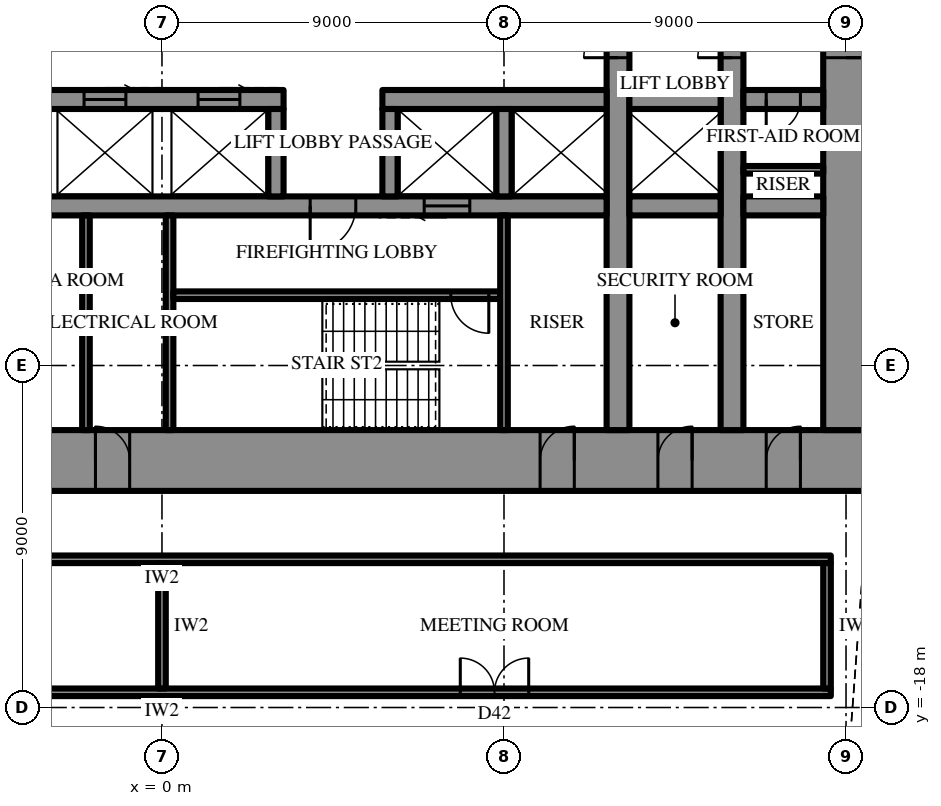
"""IFC4 building model, lengths in metres.
Left out: names, types, materials, properties, quantities, classifications, styles, units other than length and angle.
Written with IfcOpenShell. Run it as: python <this file> out.ifc"""

import sys

from ifc_helpers import new_model, si_unit, direction, frame, frame_2d, origin, place, context, subcontext, project, spatial, rectangle, extrude, element, fill, save


model = new_model("IFC4")
c1 = context("Model", 3, precision=1e-05, world=origin(), true_north=direction((0.0, 1.0)))
c2 = subcontext(c1, "Body", "Model", "MODEL_VIEW")
j1 = project(units=[si_unit("LENGTHUNIT", "METRE"), si_unit("PLANEANGLEUNIT", "RADIAN")], contexts=[c1])
p1 = place(None, origin())
s1 = spatial("IfcSite", under=j1, at=p1, CompositionType="ELEMENT")
p2 = place(p1, origin())
s2 = spatial("IfcBuilding", under=s1, at=p2, CompositionType="ELEMENT")
p3 = place(p2, frame((0.0, 0.0, 132.1)))
s3 = spatial("IfcBuildingStorey", under=s2, at=p3, CompositionType="ELEMENT", Elevation=132.1)
p4 = place(p3, frame((18.6, -11.5, 0.0), z_axis=(0.0, 0.0, 1.0), x_axis=(-1.0, 0.0, 0.0)))
e1 = element("IfcWall", 1, at=p4, inside=s3, PredefinedType="SHEAR", context=c2, shape_type="SweptSolid", body=[
    extrude(rectangle(XDim=37.2, YDim=1.6, at=frame_2d((18.6, 0.0))), origin(), (0.0, 0.0, 1.0), 4.2),
])
p5 = place(p4, frame((19.45, 0.0, 0.0)))
e2 = element("IfcOpeningElement", 2, at=p5, cuts=e1, PredefinedType="OPENING", context=c2, shape_type="SweptSolid", body=[
    extrude(rectangle(XDim=0.9, YDim=2.2, at=frame_2d((0.45, 1.1))), frame((0.0, 0.81, 0.0), z_axis=(0.0, -1.0, 0.0), x_axis=(1.0, 0.0, 0.0)), (0.0, 0.0, 1.0), 1.62),
])
p6 = place(p4, frame((22.45, 0.0, 0.0)))
e3 = element("IfcOpeningElement", 3, at=p6, cuts=e1, PredefinedType="OPENING", context=c2, shape_type="SweptSolid", body=[
    extrude(rectangle(XDim=0.9, YDim=2.2, at=frame_2d((0.45, 1.1))), frame((0.0, 0.81, 0.0), z_axis=(0.0, -1.0, 0.0), x_axis=(1.0, 0.0, 0.0)), (0.0, 0.0, 1.0), 1.62),
])
p7 = place(p4, frame((25.5, 0.0, 0.0)))
e4 = element("IfcOpeningElement", 4, at=p7, cuts=e1, PredefinedType="OPENING", context=c2, shape_type="SweptSolid", body=[
    extrude(rectangle(XDim=1.0, YDim=2.2, at=frame_2d((0.5, 1.1))), frame((0.0, 0.81, 0.0), z_axis=(0.0, -1.0, 0.0), x_axis=(1.0, 0.0, 0.0)), (0.0, 0.0, 1.0), 1.62),
])
p8 = place(p4, frame((1.8, 0.0, 0.0)))
e5 = element("IfcOpeningElement", 5, at=p8, cuts=e1, PredefinedType="OPENING", context=c2, shape_type="SweptSolid", body=[
    extrude(rectangle(XDim=0.9, YDim=2.2, at=frame_2d((0.45, 1.1))), frame((0.0, 0.81, 0.0), z_axis=(0.0, -1.0, 0.0), x_axis=(1.0, 0.0, 0.0)), (0.0, 0.0, 1.0), 1.62),
])
p9 = place(p4, frame((4.65, 0.0, 0.0)))
e6 = element("IfcOpeningElement", 6, at=p9, cuts=e1, PredefinedType="OPENING", context=c2, shape_type="SweptSolid", body=[
    extrude(rectangle(XDim=0.9, YDim=2.2, at=frame_2d((0.45, 1.1))), frame((0.0, 0.81, 0.0), z_axis=(0.0, -1.0, 0.0), x_axis=(1.0, 0.0, 0.0)), (0.0, 0.0, 1.0), 1.62),
])
p10 = place(p4, frame((7.75, 0.0, 0.0)))
e7 = element("IfcOpeningElement", 7, at=p10, cuts=e1, PredefinedType="OPENING", context=c2, shape_type="SweptSolid", body=[
    extrude(rectangle(XDim=0.9, YDim=2.2, at=frame_2d((0.45, 1.1))), frame((0.0, 0.81, 0.0), z_axis=(0.0, -1.0, 0.0), x_axis=(1.0, 0.0, 0.0)), (0.0, 0.0, 1.0), 1.62),
])
p11 = place(p4, frame((28.55, 0.0, 0.0)))
e8 = element("IfcOpeningElement", 8, at=p11, cuts=e1, PredefinedType="OPENING", context=c2, shape_type="SweptSolid", body=[
    extrude(rectangle(XDim=0.9, YDim=2.2, at=frame_2d((0.45, 1.1))), frame((0.0, 0.81, 0.0), z_axis=(0.0, -1.0, 0.0), x_axis=(1.0, 0.0, 0.0)), (0.0, 0.0, 1.0), 1.62),
])
p12 = place(p4, frame((31.65, 0.0, 0.0)))
e9 = element("IfcOpeningElement", 9, at=p12, cuts=e1, PredefinedType="OPENING", context=c2, shape_type="SweptSolid", body=[
    extrude(rectangle(XDim=0.9, YDim=2.2, at=frame_2d((0.45, 1.1))), frame((0.0, 0.81, 0.0), z_axis=(0.0, -1.0, 0.0), x_axis=(1.0, 0.0, 0.0)), (0.0, 0.0, 1.0), 1.62),
])
p13 = place(p4, frame((34.5, 0.0, 0.0)))
e10 = element("IfcOpeningElement", 10, at=p13, cuts=e1, PredefinedType="OPENING", context=c2, shape_type="SweptSolid", body=[
    extrude(rectangle(XDim=0.9, YDim=2.2, at=frame_2d((0.45, 1.1))), frame((0.0, 0.81, 0.0), z_axis=(0.0, -1.0, 0.0), x_axis=(1.0, 0.0, 0.0)), (0.0, 0.0, 1.0), 1.62),
])
p14 = place(p3, frame((18.0, -10.7, 0.0), z_axis=(0.0, 0.0, 1.0), x_axis=(0.0, 1.0, 0.0)))
e11 = element("IfcWall", 11, at=p14, inside=s3, PredefinedType="SHEAR", context=c2, shape_type="SweptSolid", body=[
    extrude(rectangle(XDim=21.4, YDim=1.2, at=frame_2d((10.7, 0.0))), origin(), (0.0, 0.0, 1.0), 4.2),
])
p15 = place(p14, frame((9.8, 0.0, 0.0)))
e12 = element("IfcOpeningElement", 12, at=p15, cuts=e11, PredefinedType="OPENING", context=c2, shape_type="SweptSolid", body=[
    extrude(rectangle(XDim=1.8, YDim=2.4, at=frame_2d((0.9, 1.2))), frame((0.0, 0.61, 0.0), z_axis=(0.0, -1.0, 0.0), x_axis=(1.0, 0.0, 0.0)), (0.0, 0.0, 1.0), 1.22),
])
p16 = place(p3, frame((12.0, -10.7, 0.0), z_axis=(0.0, 0.0, 1.0), x_axis=(0.0, 1.0, 0.0)))
e13 = element("IfcWall", 13, at=p16, inside=s3, PredefinedType="SHEAR", context=c2, shape_type="SweptSolid", body=[
    extrude(rectangle(XDim=21.4, YDim=0.6, at=frame_2d((10.7, 0.0))), origin(), (0.0, 0.0, 1.0), 4.2),
])
p17 = place(p16, frame((9.8, 0.0, 0.0)))
e14 = element("IfcOpeningElement", 14, at=p17, cuts=e13, PredefinedType="OPENING", context=c2, shape_type="SweptSolid", body=[
    extrude(rectangle(XDim=1.8, YDim=2.4, at=frame_2d((0.9, 1.2))), frame((0.0, 0.31, 0.0), z_axis=(0.0, -1.0, 0.0), x_axis=(1.0, 0.0, 0.0)), (0.0, 0.0, 1.0), 0.62),
])
p18 = place(p3, frame((15.0, -10.7, 0.0), z_axis=(0.0, 0.0, 1.0), x_axis=(0.0, 1.0, 0.0)))
e15 = element("IfcWall", 15, at=p18, inside=s3, PredefinedType="SHEAR", context=c2, shape_type="SweptSolid", body=[
    extrude(rectangle(XDim=21.4, YDim=0.6, at=frame_2d((10.7, 0.0))), origin(), (0.0, 0.0, 1.0), 4.2),
])
p19 = place(p18, frame((9.8, 0.0, 0.0)))
e16 = element("IfcOpeningElement", 16, at=p19, cuts=e15, PredefinedType="OPENING", context=c2, shape_type="SweptSolid", body=[
    extrude(rectangle(XDim=1.8, YDim=2.4, at=frame_2d((0.9, 1.2))), frame((0.0, 0.31, 0.0), z_axis=(0.0, -1.0, 0.0), x_axis=(1.0, 0.0, 0.0)), (0.0, 0.0, 1.0), 0.62),
])
p20 = place(p3, frame((17.4, -2.0, 0.0), z_axis=(0.0, 0.0, 1.0), x_axis=(-1.0, 0.0, 0.0)))
e17 = element("IfcWall", 17, at=p20, inside=s3, PredefinedType="SHEAR", context=c2, shape_type="SweptSolid", body=[
    extrude(rectangle(XDim=2.1, YDim=0.5, at=frame_2d((1.05, 0.0))), origin(), (0.0, 0.0, 1.0), 4.2),
])
p21 = place(p20, frame((0.6, 0.0, 0.0)))
e18 = element("IfcOpeningElement", 18, at=p21, cuts=e17, PredefinedType="OPENING", context=c2, shape_type="SweptSolid", body=[
    extrude(rectangle(XDim=0.9, YDim=2.2, at=frame_2d((0.45, 1.1))), frame((0.0, 0.26, 0.0), z_axis=(0.0, -1.0, 0.0), x_axis=(1.0, 0.0, 0.0)), (0.0, 0.0, 1.0), 0.52),
])
p22 = place(p3, frame((14.7, -2.0, 0.0), z_axis=(0.0, 0.0, 1.0), x_axis=(-1.0, 0.0, 0.0)))
e19 = element("IfcWall", 19, at=p22, inside=s3, PredefinedType="SHEAR", context=c2, shape_type="SweptSolid", body=[
    extrude(rectangle(XDim=2.4, YDim=0.5, at=frame_2d((1.2, 0.0))), origin(), (0.0, 0.0, 1.0), 4.2),
])
p23 = place(p3, frame((11.7, -2.0, 0.0), z_axis=(0.0, 0.0, 1.0), x_axis=(-1.0, 0.0, 0.0)))
e20 = element("IfcWall", 20, at=p23, inside=s3, PredefinedType="SHEAR", context=c2, shape_type="SweptSolid", body=[
    extrude(rectangle(XDim=5.9, YDim=0.5, at=frame_2d((2.95, 0.0))), origin(), (0.0, 0.0, 1.0), 4.2),
])
p24 = place(p3, frame((3.2, -2.0, 0.0), z_axis=(0.0, 0.0, 1.0), x_axis=(-1.0, 0.0, 0.0)))
e21 = element("IfcWall", 21, at=p24, inside=s3, PredefinedType="SHEAR", context=c2, shape_type="SweptSolid", body=[
    extrude(rectangle(XDim=14.9, YDim=0.5, at=frame_2d((7.45, 0.0))), origin(), (0.0, 0.0, 1.0), 4.2),
])
p25 = place(p24, frame((1.15, 0.0, 0.0)))
e22 = element("IfcOpeningElement", 22, at=p25, cuts=e21, PredefinedType="OPENING", context=c2, shape_type="SweptSolid", body=[
    extrude(rectangle(XDim=1.1, YDim=2.2, at=frame_2d((0.55, 1.1))), frame((0.0, 0.26, 0.0), z_axis=(0.0, -1.0, 0.0), x_axis=(1.0, 0.0, 0.0)), (0.0, 0.0, 1.0), 0.52),
])
p26 = place(p24, frame((4.15, 0.0, 0.0)))
e23 = element("IfcOpeningElement", 23, at=p26, cuts=e21, PredefinedType="OPENING", context=c2, shape_type="SweptSolid", body=[
    extrude(rectangle(XDim=1.1, YDim=2.2, at=frame_2d((0.55, 1.1))), frame((0.0, 0.26, 0.0), z_axis=(0.0, -1.0, 0.0), x_axis=(1.0, 0.0, 0.0)), (0.0, 0.0, 1.0), 0.52),
])
p27 = place(p24, frame((7.15, 0.0, 0.0)))
e24 = element("IfcOpeningElement", 24, at=p27, cuts=e21, PredefinedType="OPENING", context=c2, shape_type="SweptSolid", body=[
    extrude(rectangle(XDim=1.1, YDim=2.2, at=frame_2d((0.55, 1.1))), frame((0.0, 0.26, 0.0), z_axis=(0.0, -1.0, 0.0), x_axis=(1.0, 0.0, 0.0)), (0.0, 0.0, 1.0), 0.52),
])
p28 = place(p24, frame((10.15, 0.0, 0.0)))
e25 = element("IfcOpeningElement", 25, at=p28, cuts=e21, PredefinedType="OPENING", context=c2, shape_type="SweptSolid", body=[
    extrude(rectangle(XDim=1.1, YDim=2.2, at=frame_2d((0.55, 1.1))), frame((0.0, 0.26, 0.0), z_axis=(0.0, -1.0, 0.0), x_axis=(1.0, 0.0, 0.0)), (0.0, 0.0, 1.0), 0.52),
])
p29 = place(p3, frame((17.4, -4.8, 0.0), z_axis=(0.0, 0.0, 1.0), x_axis=(-1.0, 0.0, 0.0)))
e26 = element("IfcWall", 26, at=p29, inside=s3, PredefinedType="SHEAR", context=c2, shape_type="SweptSolid", body=[
    extrude(rectangle(XDim=2.1, YDim=0.5, at=frame_2d((1.05, 0.0))), origin(), (0.0, 0.0, 1.0), 4.2),
])
p30 = place(p3, frame((14.7, -4.8, 0.0), z_axis=(0.0, 0.0, 1.0), x_axis=(-1.0, 0.0, 0.0)))
e27 = element("IfcWall", 27, at=p30, inside=s3, PredefinedType="SHEAR", context=c2, shape_type="SweptSolid", body=[
    extrude(rectangle(XDim=2.4, YDim=0.5, at=frame_2d((1.2, 0.0))), origin(), (0.0, 0.0, 1.0), 4.2),
])
p31 = place(p3, frame((11.7, -4.8, 0.0), z_axis=(0.0, 0.0, 1.0), x_axis=(-1.0, 0.0, 0.0)))
e28 = element("IfcWall", 28, at=p31, inside=s3, PredefinedType="SHEAR", context=c2, shape_type="SweptSolid", body=[
    extrude(rectangle(XDim=23.4, YDim=0.5, at=frame_2d((11.7, 0.0))), origin(), (0.0, 0.0, 1.0), 4.2),
])
p32 = place(p31, frame((6.6, 0.0, 0.0)))
e29 = element("IfcOpeningElement", 29, at=p32, cuts=e28, PredefinedType="OPENING", context=c2, shape_type="SweptSolid", body=[
    extrude(rectangle(XDim=1.2, YDim=2.2, at=frame_2d((0.6, 1.1))), frame((0.0, 0.26, 0.0), z_axis=(0.0, -1.0, 0.0), x_axis=(1.0, 0.0, 0.0)), (0.0, 0.0, 1.0), 0.52),
])
p33 = place(p31, frame((3.6, 0.0, 0.0)))
e30 = element("IfcOpeningElement", 30, at=p33, cuts=e28, PredefinedType="OPENING", context=c2, shape_type="SweptSolid", body=[
    extrude(rectangle(XDim=1.2, YDim=2.2, at=frame_2d((0.6, 1.1))), frame((0.0, 0.26, 0.0), z_axis=(0.0, -1.0, 0.0), x_axis=(1.0, 0.0, 0.0)), (0.0, 0.0, 1.0), 0.52),
])
for number, where, z_axis, x_axis in (
    (31, (9.0, -2.25, 0.0), (0.0, 0.0, 1.0), (0.0, -1.0, 0.0)),
    (32, (6.0, -2.25, 0.0), (0.0, 0.0, 1.0), (0.0, -1.0, 0.0)),
    (33, (3.0, -2.25, 0.0), (0.0, 0.0, 1.0), (0.0, -1.0, 0.0)),
):
    element("IfcWall", number, at=place(p3, frame(where, z_axis=z_axis, x_axis=x_axis)), inside=s3, PredefinedType="SHEAR", context=c2, shape_type="SweptSolid", body=[
        extrude(rectangle(XDim=2.3, YDim=0.4, at=frame_2d((1.15, 0.0))), origin(), (0.0, 0.0, 1.0), 4.2),
    ])
p34 = place(p3, frame((0.2, -5.05, 0.0), z_axis=(0.0, 0.0, 1.0), x_axis=(0.0, -1.0, 0.0)))
e34 = element("IfcWall", 34, at=p34, inside=s3, PredefinedType="SHEAR", context=c2, shape_type="SweptSolid", body=[
    extrude(rectangle(XDim=5.65, YDim=0.2, at=frame_2d((2.825, 0.0))), origin(), (0.0, 0.0, 1.0), 4.2),
])
p35 = place(p3, frame((8.9, -7.15, 0.0), z_axis=(0.0, 0.0, 1.0), x_axis=(-1.0, 0.0, 0.0)))
e35 = element("IfcWall", 35, at=p35, inside=s3, PredefinedType="SHEAR", context=c2, shape_type="SweptSolid", body=[
    extrude(rectangle(XDim=8.6, YDim=0.2, at=frame_2d((4.3, 0.0))), origin(), (0.0, 0.0, 1.0), 4.2),
])
p36 = place(p35, frame((0.3, 0.0, 0.0)))
e36 = element("IfcOpeningElement", 36, at=p36, cuts=e35, PredefinedType="OPENING", context=c2, shape_type="SweptSolid", body=[
    extrude(rectangle(XDim=1.0, YDim=2.2, at=frame_2d((0.5, 1.1))), frame((0.0, 0.11, 0.0), z_axis=(0.0, -1.0, 0.0), x_axis=(1.0, 0.0, 0.0)), (0.0, 0.0, 1.0), 0.22),
])
for number, where, z_axis, x_axis in (
    (37, (9.0, -5.05, 0.0), (0.0, 0.0, 1.0), (0.0, -1.0, 0.0)),
    (38, (-2.0, -5.05, 0.0), (0.0, 0.0, 1.0), (0.0, -1.0, 0.0)),
):
    element("IfcWall", number, at=place(p3, frame(where, z_axis=z_axis, x_axis=x_axis)), inside=s3, PredefinedType="PARTITIONING", context=c2, shape_type="SweptSolid", body=[
        extrude(rectangle(XDim=5.65, YDim=0.2, at=frame_2d((2.825, 0.0))), origin(), (0.0, 0.0, 1.0), 4.0),
    ])
p37 = place(p3, frame((17.4, -3.85, 0.0), z_axis=(0.0, 0.0, 1.0), x_axis=(-1.0, 0.0, 0.0)))
e39 = element("IfcWall", 39, at=p37, inside=s3, PredefinedType="PARTITIONING", context=c2, shape_type="SweptSolid", body=[
    extrude(rectangle(XDim=2.1, YDim=0.2, at=frame_2d((1.05, 0.0))), origin(), (0.0, 0.0, 1.0), 4.0),
])
p38 = place(p3, frame((17.6, -14.1, 0.0), z_axis=(0.0, 0.0, 1.0), x_axis=(-1.0, 0.0, 0.0)))
e40 = element("IfcWall", 40, at=p38, inside=s3, PredefinedType="PARTITIONING", context=c2, shape_type="SweptSolid", body=[
    extrude(rectangle(XDim=35.2, YDim=0.2, at=frame_2d((17.6, 0.0))), origin(), (0.0, 0.0, 1.0), 4.0),
])
p39 = place(p3, frame((17.6, -17.6, 0.0), z_axis=(0.0, 0.0, 1.0), x_axis=(-1.0, 0.0, 0.0)))
e41 = element("IfcWall", 41, at=p39, inside=s3, PredefinedType="PARTITIONING", context=c2, shape_type="SweptSolid", body=[
    extrude(rectangle(XDim=35.2, YDim=0.2, at=frame_2d((17.6, 0.0))), origin(), (0.0, 0.0, 1.0), 4.0),
])
p40 = place(p39, frame((7.95, 0.0, 0.0)))
e42 = element("IfcOpeningElement", 42, at=p40, cuts=e41, PredefinedType="OPENING", context=c2, shape_type="SweptSolid", body=[
    extrude(rectangle(XDim=1.8, YDim=2.4, at=frame_2d((0.9, 1.2))), frame((0.0, 0.11, 0.0), z_axis=(0.0, -1.0, 0.0), x_axis=(1.0, 0.0, 0.0)), (0.0, 0.0, 1.0), 0.22),
])
p41 = place(p39, frame((25.45, 0.0, 0.0)))
e43 = element("IfcOpeningElement", 43, at=p41, cuts=e41, PredefinedType="OPENING", context=c2, shape_type="SweptSolid", body=[
    extrude(rectangle(XDim=1.8, YDim=2.4, at=frame_2d((0.9, 1.2))), frame((0.0, 0.11, 0.0), z_axis=(0.0, -1.0, 0.0), x_axis=(1.0, 0.0, 0.0)), (0.0, 0.0, 1.0), 0.22),
])
p42 = place(p3, frame((17.5, -14.2, 0.0), z_axis=(0.0, 0.0, 1.0), x_axis=(0.0, -1.0, 0.0)))
e44 = element("IfcWall", 44, at=p42, inside=s3, PredefinedType="PARTITIONING", context=c2, shape_type="SweptSolid", body=[
    extrude(rectangle(XDim=3.3, YDim=0.2, at=frame_2d((1.65, 0.0))), origin(), (0.0, 0.0, 1.0), 4.0),
])
p43 = place(p3, frame((0.0, -14.2, 0.0), z_axis=(0.0, 0.0, 1.0), x_axis=(0.0, -1.0, 0.0)))
e45 = element("IfcWall", 45, at=p43, inside=s3, PredefinedType="PARTITIONING", context=c2, shape_type="SweptSolid", body=[
    extrude(rectangle(XDim=3.3, YDim=0.2, at=frame_2d((1.65, 0.0))), origin(), (0.0, 0.0, 1.0), 2.992),
])
p44 = place(p3, frame((17.463, -21.753, 0.0), z_axis=(0.0, 0.0, 1.0), x_axis=(0.500010972563, 0.86601906868, 0.0)))
e46 = element("IfcWall", 46, at=p44, inside=s3, PredefinedType="PARTITIONING", context=c2, shape_type="SweptSolid", body=[
    extrude(rectangle(XDim=15.211, YDim=0.2, at=frame_2d((7.605, 0.0))), origin(), (0.0, 0.0, 1.0), 4.0),
])
p45 = place(p44, frame((7.105, 0.0, 0.0)))
e47 = element("IfcOpeningElement", 47, at=p45, cuts=e46, PredefinedType="OPENING", context=c2, shape_type="SweptSolid", body=[
    extrude(rectangle(XDim=1.0, YDim=2.2, at=frame_2d((0.5, 1.1))), frame((0.0, 0.11, 0.0), z_axis=(0.0, -1.0, 0.0), x_axis=(1.0, 0.0, 0.0)), (0.0, 0.0, 1.0), 0.22),
])
p46 = place(p15, frame((1.8, 0.0, 0.0), z_axis=(0.0, 0.0, 1.0), x_axis=(-1.0, 0.0, 0.0)))
e48 = element("IfcDoor", 48, at=p46, inside=s3, OperationType="DOUBLE_DOOR_SINGLE_SWING", PredefinedType="DOOR", context=c2, shape_type="SweptSolid", body=[
    extrude(rectangle(XDim=1.8, YDim=2.4, at=frame_2d((0.9, 1.2))), frame((0.0, 0.025, 0.0), z_axis=(0.0, -1.0, 0.0), x_axis=(1.0, 0.0, 0.0)), (0.0, 0.0, 1.0), 0.05),
])
fill(e12, e48)
p47 = place(p32, origin())
e49 = element("IfcDoor", 49, at=p47, inside=s3, OperationType="SINGLE_SWING_LEFT", PredefinedType="DOOR", context=c2, shape_type="SweptSolid", body=[
    extrude(rectangle(XDim=1.2, YDim=2.2, at=frame_2d((0.6, 1.1))), frame((0.0, 0.025, 0.0), z_axis=(0.0, -1.0, 0.0), x_axis=(1.0, 0.0, 0.0)), (0.0, 0.0, 1.0), 0.05),
])
fill(e29, e49)
p48 = place(p36, origin())
e50 = element("IfcDoor", 50, at=p48, inside=s3, OperationType="SINGLE_SWING_RIGHT", PredefinedType="DOOR", context=c2, shape_type="SweptSolid", body=[
    extrude(rectangle(XDim=1.0, YDim=2.2, at=frame_2d((0.5, 1.1))), frame((0.0, 0.025, 0.0), z_axis=(0.0, -1.0, 0.0), x_axis=(1.0, 0.0, 0.0)), (0.0, 0.0, 1.0), 0.05),
])
fill(e36, e50)
p49 = place(p5, frame((0.9, 0.0, 0.0), z_axis=(0.0, 0.0, 1.0), x_axis=(-1.0, 0.0, 0.0)))
e51 = element("IfcDoor", 51, at=p49, inside=s3, OperationType="SINGLE_SWING_RIGHT", PredefinedType="DOOR", context=c2, shape_type="SweptSolid", body=[
    extrude(rectangle(XDim=0.9, YDim=2.2, at=frame_2d((0.45, 1.1))), frame((0.0, 0.025, 0.0), z_axis=(0.0, -1.0, 0.0), x_axis=(1.0, 0.0, 0.0)), (0.0, 0.0, 1.0), 0.05),
])
fill(e2, e51)
p50 = place(p8, frame((0.9, 0.0, 0.0), z_axis=(0.0, 0.0, 1.0), x_axis=(-1.0, 0.0, 0.0)))
e52 = element("IfcDoor", 52, at=p50, inside=s3, OperationType="SINGLE_SWING_LEFT", PredefinedType="DOOR", context=c2, shape_type="SweptSolid", body=[
    extrude(rectangle(XDim=0.9, YDim=2.2, at=frame_2d((0.45, 1.1))), frame((0.0, 0.025, 0.0), z_axis=(0.0, -1.0, 0.0), x_axis=(1.0, 0.0, 0.0)), (0.0, 0.0, 1.0), 0.05),
])
fill(e5, e52)
p51 = place(p9, frame((0.9, 0.0, 0.0), z_axis=(0.0, 0.0, 1.0), x_axis=(-1.0, 0.0, 0.0)))
e53 = element("IfcDoor", 53, at=p51, inside=s3, OperationType="SINGLE_SWING_LEFT", PredefinedType="DOOR", context=c2, shape_type="SweptSolid", body=[
    extrude(rectangle(XDim=0.9, YDim=2.2, at=frame_2d((0.45, 1.1))), frame((0.0, 0.025, 0.0), z_axis=(0.0, -1.0, 0.0), x_axis=(1.0, 0.0, 0.0)), (0.0, 0.0, 1.0), 0.05),
])
fill(e6, e53)
p52 = place(p10, frame((0.9, 0.0, 0.0), z_axis=(0.0, 0.0, 1.0), x_axis=(-1.0, 0.0, 0.0)))
e54 = element("IfcDoor", 54, at=p52, inside=s3, OperationType="SINGLE_SWING_LEFT", PredefinedType="DOOR", context=c2, shape_type="SweptSolid", body=[
    extrude(rectangle(XDim=0.9, YDim=2.2, at=frame_2d((0.45, 1.1))), frame((0.0, 0.025, 0.0), z_axis=(0.0, -1.0, 0.0), x_axis=(1.0, 0.0, 0.0)), (0.0, 0.0, 1.0), 0.05),
])
fill(e7, e54)
p53 = place(p21, origin())
e55 = element("IfcDoor", 55, at=p53, inside=s3, OperationType="SINGLE_SWING_LEFT", PredefinedType="DOOR", context=c2, shape_type="SweptSolid", body=[
    extrude(rectangle(XDim=0.9, YDim=2.2, at=frame_2d((0.45, 1.1))), frame((0.0, 0.025, 0.0), z_axis=(0.0, -1.0, 0.0), x_axis=(1.0, 0.0, 0.0)), (0.0, 0.0, 1.0), 0.05),
])
fill(e18, e55)
p54 = place(p17, origin())
e56 = element("IfcDoor", 56, at=p54, inside=s3, OperationType="DOUBLE_DOOR_SINGLE_SWING", PredefinedType="DOOR", context=c2, shape_type="SweptSolid", body=[
    extrude(rectangle(XDim=1.8, YDim=2.4, at=frame_2d((0.9, 1.2))), frame((0.0, 0.025, 0.0), z_axis=(0.0, -1.0, 0.0), x_axis=(1.0, 0.0, 0.0)), (0.0, 0.0, 1.0), 0.05),
])
fill(e14, e56)
p55 = place(p19, origin())
e57 = element("IfcDoor", 57, at=p55, inside=s3, OperationType="DOUBLE_DOOR_SINGLE_SWING", PredefinedType="DOOR", context=c2, shape_type="SweptSolid", body=[
    extrude(rectangle(XDim=1.8, YDim=2.4, at=frame_2d((0.9, 1.2))), frame((0.0, 0.025, 0.0), z_axis=(0.0, -1.0, 0.0), x_axis=(1.0, 0.0, 0.0)), (0.0, 0.0, 1.0), 0.05),
])
fill(e16, e57)
p56 = place(p33, origin())
e58 = element("IfcDoor", 58, at=p56, inside=s3, OperationType="SLIDING_TO_LEFT", PredefinedType="DOOR", context=c2, shape_type="SweptSolid", body=[
    extrude(rectangle(XDim=1.2, YDim=2.2, at=frame_2d((0.6, 1.1))), frame((0.0, 0.025, 0.0), z_axis=(0.0, -1.0, 0.0), x_axis=(1.0, 0.0, 0.0)), (0.0, 0.0, 1.0), 0.05),
])
fill(e30, e58)
p57 = place(p25, frame((1.1, 0.0, 0.0), z_axis=(0.0, 0.0, 1.0), x_axis=(-1.0, 0.0, 0.0)))
e59 = element("IfcDoor", 59, at=p57, inside=s3, OperationType="SLIDING_TO_LEFT", PredefinedType="DOOR", context=c2, shape_type="SweptSolid", body=[
    extrude(rectangle(XDim=1.1, YDim=2.2, at=frame_2d((0.55, 1.1))), frame((0.0, 0.025, 0.0), z_axis=(0.0, -1.0, 0.0), x_axis=(1.0, 0.0, 0.0)), (0.0, 0.0, 1.0), 0.05),
])
fill(e22, e59)
p58 = place(p26, frame((1.1, 0.0, 0.0), z_axis=(0.0, 0.0, 1.0), x_axis=(-1.0, 0.0, 0.0)))
e60 = element("IfcDoor", 60, at=p58, inside=s3, OperationType="SLIDING_TO_LEFT", PredefinedType="DOOR", context=c2, shape_type="SweptSolid", body=[
    extrude(rectangle(XDim=1.1, YDim=2.2, at=frame_2d((0.55, 1.1))), frame((0.0, 0.025, 0.0), z_axis=(0.0, -1.0, 0.0), x_axis=(1.0, 0.0, 0.0)), (0.0, 0.0, 1.0), 0.05),
])
fill(e23, e60)
p59 = place(p40, frame((1.8, 0.0, 0.0), z_axis=(0.0, 0.0, 1.0), x_axis=(-1.0, 0.0, 0.0)))
e61 = element("IfcDoor", 61, at=p59, inside=s3, OperationType="DOUBLE_DOOR_SINGLE_SWING", PredefinedType="DOOR", context=c2, shape_type="SweptSolid", body=[
    extrude(rectangle(XDim=1.8, YDim=2.4, at=frame_2d((0.9, 1.2))), frame((0.0, 0.025, 0.0), z_axis=(0.0, -1.0, 0.0), x_axis=(1.0, 0.0, 0.0)), (0.0, 0.0, 1.0), 0.05),
])
fill(e42, e61)
save(model, sys.argv[1])
